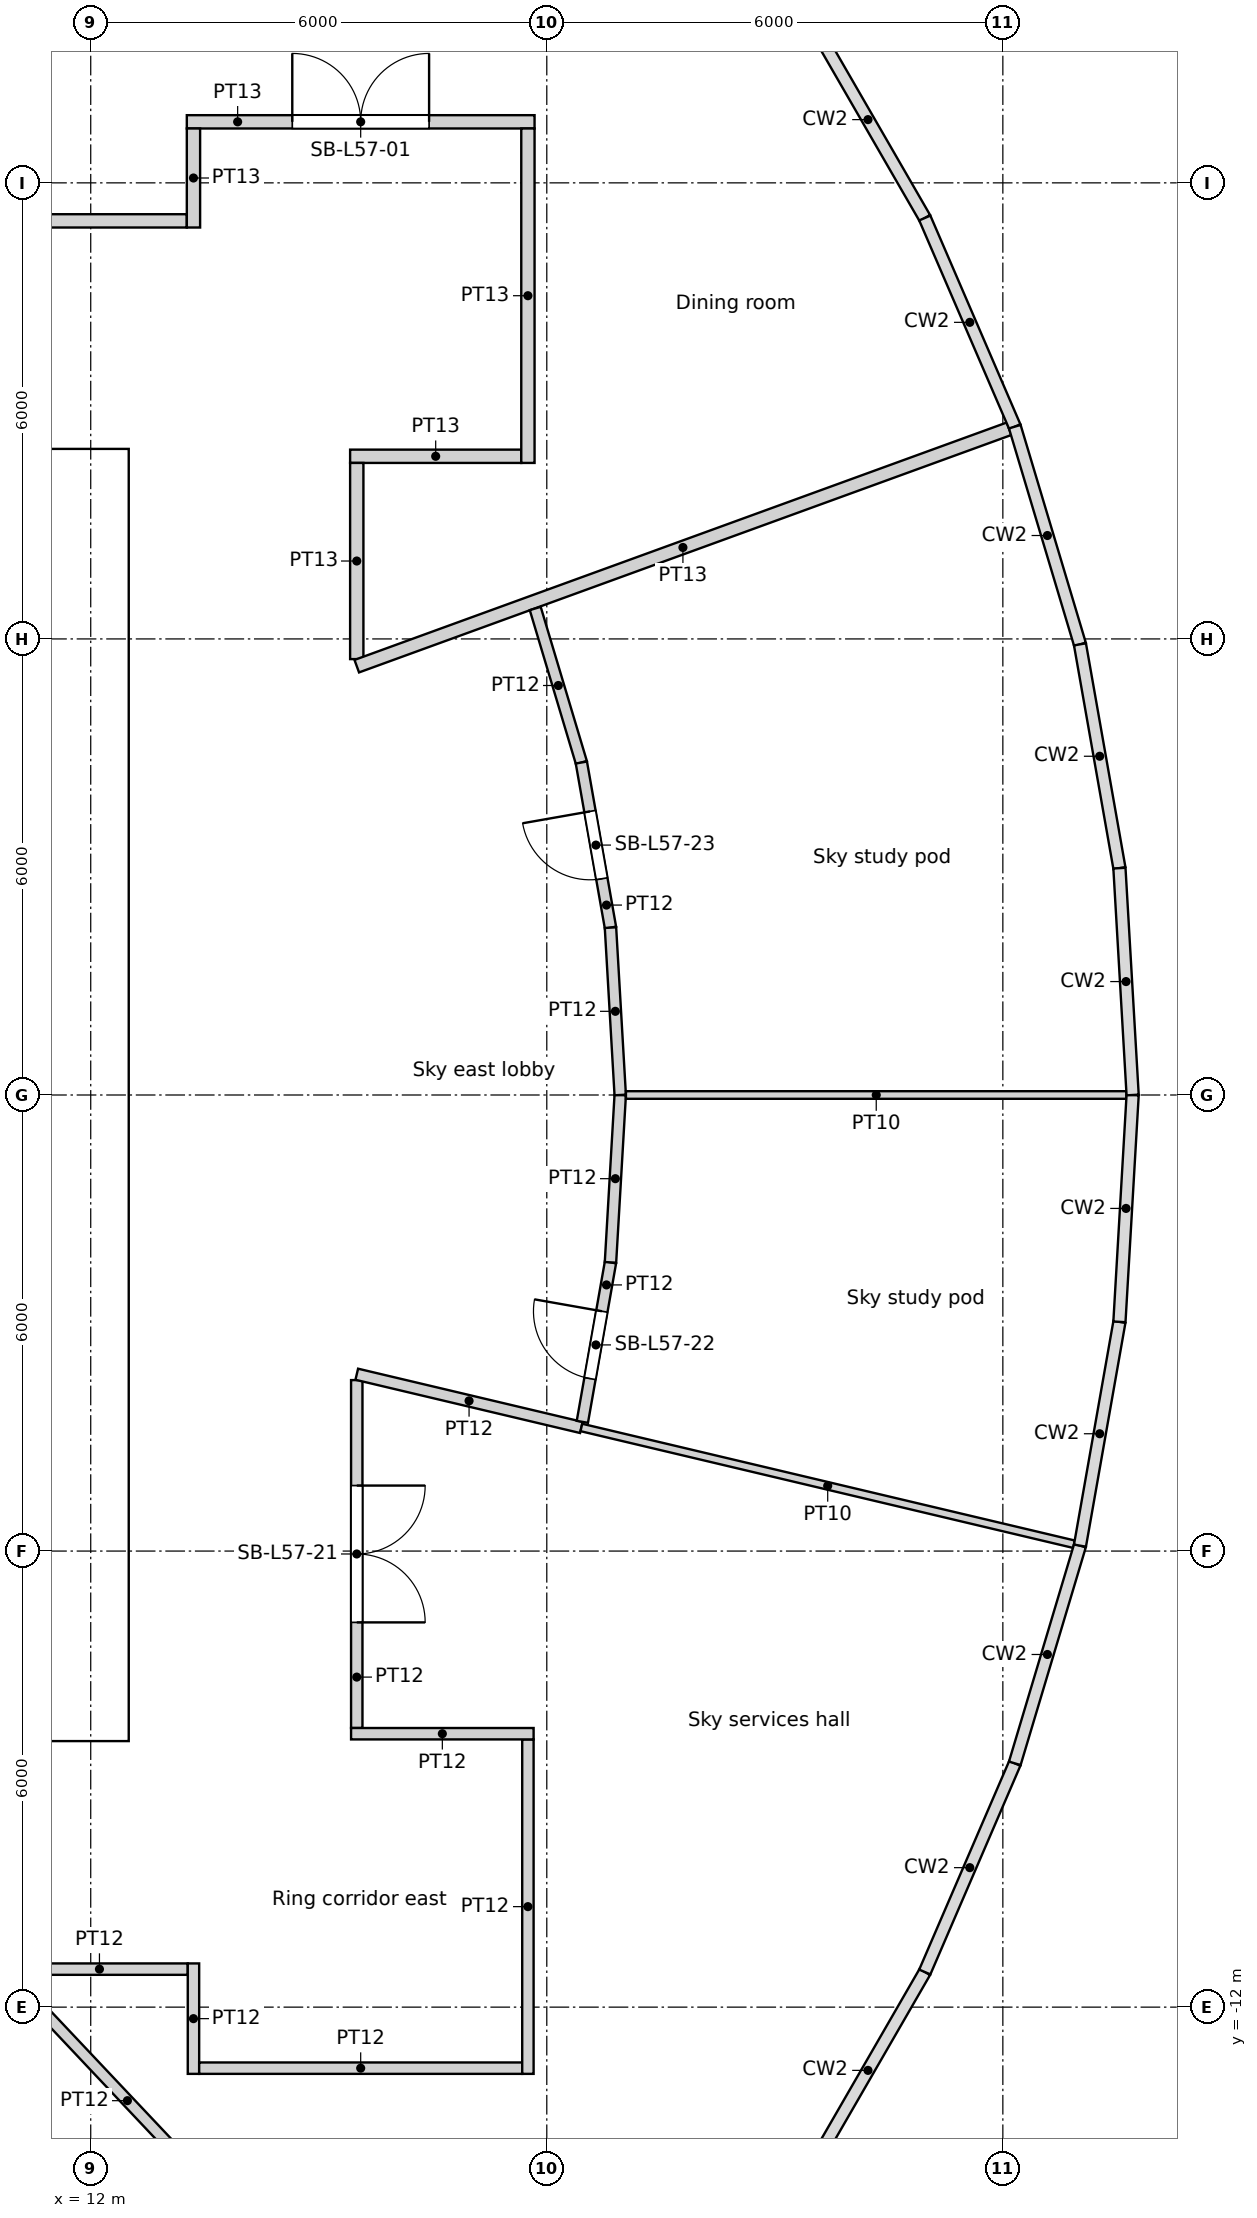
"""IFC4 building model, lengths in metres.
Left out: names, types, materials, properties, quantities, classifications, styles, units other than length and angle.
Written with IfcOpenShell. Run it as: python <this file> out.ifc"""

import sys

from ifc_helpers import new_model, si_unit, direction, frame, frame_2d, origin, origin_2d, place, context, subcontext, project, spatial, rectangle, circle, extrude, element, fill, save


model = new_model("IFC4")
c1 = context("Model", 3, precision=1e-05, world=origin(), true_north=direction((0.0, 1.0)))
c2 = subcontext(c1, "Body", "Model", "MODEL_VIEW")
j1 = project(units=[si_unit("LENGTHUNIT", "METRE"), si_unit("PLANEANGLEUNIT", "RADIAN")], contexts=[c1])
p1 = place(None, origin())
s1 = spatial("IfcSite", under=j1, at=p1, CompositionType="ELEMENT")
p2 = place(p1, origin())
s2 = spatial("IfcBuilding", under=s1, at=p2, CompositionType="ELEMENT")
p3 = place(p2, frame((0.0, 0.0, 219.6)))
s3 = spatial("IfcBuildingStorey", under=s2, at=p3, CompositionType="ELEMENT", Elevation=219.6)
for number, where, z_axis, x_axis in (
    (1, (24.548, 0.0, 0.0), (0.0, 0.0, 1.0), (1.0, 0.0, 0.0)),
    (2, (23.886, 5.661, 0.0), (0.0, 0.0, 1.0), (1.0, 0.0, 0.0)),
    (3, (21.937, 11.017, 0.0), (0.0, 0.0, 1.0), (1.0, 0.0, 0.0)),
    (4, (21.937, -11.017, 0.0), (0.0, 0.0, 1.0), (1.0, 0.0, 0.0)),
    (5, (23.886, -5.661, 0.0), (0.0, 0.0, 1.0), (1.0, 0.0, 0.0)),
):
    element("IfcColumn", number, at=place(p3, frame(where, z_axis=z_axis, x_axis=x_axis)), inside=s3, PredefinedType="COLUMN", context=c2, shape_type="SweptSolid", body=[
        extrude(circle(Radius=0.6, at=origin_2d()), origin(), (0.0, 0.0, 1.0), 5.4),
    ])
for number, where, z_axis, x_axis in (
    (6, (18.822, 0.0, 0.0), (0.0, 0.0, 1.0), (1.0, 0.0, 0.0)),
    (7, (17.986, 5.548, 0.0), (0.0, 0.0, 1.0), (1.0, 0.0, 0.0)),
    (8, (15.552, 10.603, 0.0), (0.0, 0.0, 1.0), (1.0, 0.0, 0.0)),
    (9, (15.552, -10.603, 0.0), (0.0, 0.0, 1.0), (1.0, 0.0, 0.0)),
    (10, (17.986, -5.548, 0.0), (0.0, 0.0, 1.0), (1.0, 0.0, 0.0)),
):
    element("IfcColumn", number, at=place(p3, frame(where, z_axis=z_axis, x_axis=x_axis)), inside=s3, PredefinedType="COLUMN", context=c2, shape_type="SweptSolid", body=[
        extrude(circle(Radius=0.65, at=origin_2d()), origin(), (0.0, 0.0, 1.0), 5.4),
    ])
p4 = place(p3, frame((-12.5, -8.05, 0.0), z_axis=(0.0, 0.0, 1.0), x_axis=(1.0, 0.0, 0.0)))
e11 = element("IfcWall", 11, at=p4, inside=s3, PredefinedType="SOLIDWALL", context=c2, shape_type="SweptSolid", body=[
    extrude(rectangle(XDim=25.0, YDim=0.9, at=frame_2d((12.5, 0.0))), origin(), (0.0, 0.0, 1.0), 5.4),
])
p5 = place(p4, frame((13.4, 0.0, 0.0)))
e12 = element("IfcOpeningElement", 12, at=p5, cuts=e11, PredefinedType="OPENING", context=c2, shape_type="SweptSolid", body=[
    extrude(rectangle(XDim=1.0, YDim=2.1, at=frame_2d((0.5, 1.05))), frame((0.0, 0.45, 0.0), z_axis=(0.0, -1.0, 0.0), x_axis=(1.0, 0.0, 0.0)), (0.0, 0.0, 1.0), 0.9),
])
p6 = place(p4, frame((8.3, 0.0, 0.0)))
e13 = element("IfcOpeningElement", 13, at=p6, cuts=e11, PredefinedType="OPENING", context=c2, shape_type="SweptSolid", body=[
    extrude(rectangle(XDim=1.8, YDim=2.1, at=frame_2d((0.9, 1.05))), frame((0.0, 0.45, 0.0), z_axis=(0.0, -1.0, 0.0), x_axis=(1.0, 0.0, 0.0)), (0.0, 0.0, 1.0), 0.9),
])
p7 = place(p4, frame((14.9, 0.0, 0.0)))
e14 = element("IfcOpeningElement", 14, at=p7, cuts=e11, PredefinedType="OPENING", context=c2, shape_type="SweptSolid", body=[
    extrude(rectangle(XDim=1.8, YDim=2.1, at=frame_2d((0.9, 1.05))), frame((0.0, 0.45, 0.0), z_axis=(0.0, -1.0, 0.0), x_axis=(1.0, 0.0, 0.0)), (0.0, 0.0, 1.0), 0.9),
])
p8 = place(p3, frame((-12.5, 8.05, 0.0), z_axis=(0.0, 0.0, 1.0), x_axis=(1.0, 0.0, 0.0)))
e15 = element("IfcWall", 15, at=p8, inside=s3, PredefinedType="SOLIDWALL", context=c2, shape_type="SweptSolid", body=[
    extrude(rectangle(XDim=25.0, YDim=0.9, at=frame_2d((12.5, 0.0))), origin(), (0.0, 0.0, 1.0), 5.4),
])
p9 = place(p8, frame((8.3, 0.0, 0.0)))
e16 = element("IfcOpeningElement", 16, at=p9, cuts=e15, PredefinedType="OPENING", context=c2, shape_type="SweptSolid", body=[
    extrude(rectangle(XDim=1.8, YDim=2.1, at=frame_2d((0.9, 1.05))), frame((0.0, 0.45, 0.0), z_axis=(0.0, -1.0, 0.0), x_axis=(1.0, 0.0, 0.0)), (0.0, 0.0, 1.0), 0.9),
])
p10 = place(p3, frame((12.05, -7.6, 0.0), z_axis=(0.0, 0.0, 1.0), x_axis=(0.0, 1.0, 0.0)))
e17 = element("IfcWall", 17, at=p10, inside=s3, PredefinedType="SOLIDWALL", context=c2, shape_type="SweptSolid", body=[
    extrude(rectangle(XDim=15.2, YDim=0.9, at=frame_2d((7.6, 0.0))), origin(), (0.0, 0.0, 1.0), 5.4),
])
p11 = place(p10, frame((5.1, 0.0, 0.0)))
e18 = element("IfcOpeningElement", 18, at=p11, cuts=e17, PredefinedType="OPENING", context=c2, shape_type="SweptSolid", body=[
    extrude(rectangle(XDim=1.0, YDim=2.1, at=frame_2d((0.5, 1.05))), frame((0.0, 0.45, 0.0), z_axis=(0.0, -1.0, 0.0), x_axis=(1.0, 0.0, 0.0)), (0.0, 0.0, 1.0), 0.9),
])
p12 = place(p3, frame((9.2, -4.55, 0.0), z_axis=(0.0, 0.0, 1.0), x_axis=(1.0, 0.0, 0.0)))
e19 = element("IfcWall", 19, at=p12, inside=s3, PredefinedType="SOLIDWALL", context=c2, shape_type="SweptSolid", body=[
    extrude(rectangle(XDim=2.4, YDim=0.3, at=frame_2d((1.2, 0.0))), origin(), (0.0, 0.0, 1.0), 4.9),
])
p13 = place(p12, frame((0.65, 0.0, 0.0)))
e20 = element("IfcOpeningElement", 20, at=p13, cuts=e19, PredefinedType="OPENING", context=c2, shape_type="SweptSolid", body=[
    extrude(rectangle(XDim=1.1, YDim=2.1, at=frame_2d((0.55, 1.05))), frame((0.0, 0.15, 0.0), z_axis=(0.0, -1.0, 0.0), x_axis=(1.0, 0.0, 0.0)), (0.0, 0.0, 1.0), 0.3),
])
p14 = place(p3, frame((9.2, 4.55, 0.0), z_axis=(0.0, 0.0, 1.0), x_axis=(1.0, 0.0, 0.0)))
e21 = element("IfcWall", 21, at=p14, inside=s3, PredefinedType="SOLIDWALL", context=c2, shape_type="SweptSolid", body=[
    extrude(rectangle(XDim=2.4, YDim=0.3, at=frame_2d((1.2, 0.0))), origin(), (0.0, 0.0, 1.0), 4.9),
])
p15 = place(p14, frame((0.65, 0.0, 0.0)))
e22 = element("IfcOpeningElement", 22, at=p15, cuts=e21, PredefinedType="OPENING", context=c2, shape_type="SweptSolid", body=[
    extrude(rectangle(XDim=1.1, YDim=2.1, at=frame_2d((0.55, 1.05))), frame((0.0, 0.15, 0.0), z_axis=(0.0, -1.0, 0.0), x_axis=(1.0, 0.0, 0.0)), (0.0, 0.0, 1.0), 0.3),
])
p16 = place(p3, frame((10.953, -11.5, 0.0), z_axis=(0.0, 0.0, 1.0), x_axis=(1.0, 0.0, 0.0)))
e23 = element("IfcWall", 23, at=p16, inside=s3, PredefinedType="PARTITIONING", context=c2, shape_type="SweptSolid", body=[
    extrude(rectangle(XDim=2.324, YDim=0.15, at=frame_2d((1.162, 0.0))), origin(), (0.0, 0.0, 1.0), 4.1),
])
p17 = place(p3, frame((13.427, -12.803, 0.0), z_axis=(0.0, 0.0, 1.0), x_axis=(1.0, 0.0, 0.0)))
e24 = element("IfcWall", 24, at=p17, inside=s3, PredefinedType="PARTITIONING", context=c2, shape_type="SweptSolid", body=[
    extrude(rectangle(XDim=4.25, YDim=0.15, at=frame_2d((2.125, 0.0))), origin(), (0.0, 0.0, 1.0), 4.1),
])
p18 = place(p3, frame((13.352, -11.425, 0.0), z_axis=(0.0, 0.0, 1.0), x_axis=(0.0, -1.0, 0.0)))
e25 = element("IfcWall", 25, at=p18, inside=s3, PredefinedType="PARTITIONING", context=c2, shape_type="SweptSolid", body=[
    extrude(rectangle(XDim=1.453, YDim=0.15, at=frame_2d((0.727, 0.0))), origin(), (0.0, 0.0, 1.0), 4.1),
])
p19 = place(p3, frame((13.264, 11.5, 0.0), z_axis=(0.0, 0.0, 1.0), x_axis=(-1.0, 0.0, 0.0)))
e26 = element("IfcWall", 26, at=p19, inside=s3, PredefinedType="PARTITIONING", context=c2, shape_type="SweptSolid", body=[
    extrude(rectangle(XDim=4.594, YDim=0.175, at=frame_2d((2.297, 0.0))), origin(), (0.0, 0.0, 1.0), 4.1),
])
p20 = place(p3, frame((13.352, 12.715, 0.0), z_axis=(0.0, 0.0, 1.0), x_axis=(0.0, -1.0, 0.0)))
e27 = element("IfcWall", 27, at=p20, inside=s3, PredefinedType="PARTITIONING", context=c2, shape_type="SweptSolid", body=[
    extrude(rectangle(XDim=1.303, YDim=0.175, at=frame_2d((0.651, 0.0))), origin(), (0.0, 0.0, 1.0), 4.1),
])
p21 = place(p3, frame((14.115, -14.961, 0.0), z_axis=(0.0, 0.0, 1.0), x_axis=(-0.686260376194, 0.727355962418, 0.0)))
e28 = element("IfcWall", 28, at=p21, inside=s3, PredefinedType="PARTITIONING", context=c2, shape_type="SweptSolid", body=[
    extrude(rectangle(XDim=4.759, YDim=0.15, at=frame_2d((2.379, 0.0))), origin(), (0.0, 0.0, 1.0), 4.1),
])
p22 = place(p3, frame((15.304, 20.556, 0.0), z_axis=(0.0, 0.0, 1.0), x_axis=(-0.597169661875, -0.802114951199, 0.0)))
e29 = element("IfcWall", 29, at=p22, inside=s3, PredefinedType="PARTITIONING", context=c2, shape_type="SweptSolid", body=[
    extrude(rectangle(XDim=11.291, YDim=0.175, at=frame_2d((5.645, 0.0))), origin(), (0.0, 0.0, 1.0), 4.1),
])
p23 = place(p3, frame((15.5, -3.751, 0.0), z_axis=(0.0, 0.0, 1.0), x_axis=(0.0, -1.0, 0.0)))
e30 = element("IfcWall", 30, at=p23, inside=s3, PredefinedType="PARTITIONING", context=c2, shape_type="SweptSolid", body=[
    extrude(rectangle(XDim=4.577, YDim=0.15, at=frame_2d((2.289, 0.0))), origin(), (0.0, 0.0, 1.0), 4.1),
])
p24 = place(p23, frame((1.388, 0.0, 0.0)))
e31 = element("IfcOpeningElement", 31, at=p24, cuts=e30, PredefinedType="OPENING", context=c2, shape_type="SweptSolid", body=[
    extrude(rectangle(XDim=1.8, YDim=2.4, at=frame_2d((0.9, 1.2))), frame((0.0, 0.075, 0.0), z_axis=(0.0, -1.0, 0.0), x_axis=(1.0, 0.0, 0.0)), (0.0, 0.0, 1.0), 0.15),
])
p25 = place(p3, frame((15.5, 5.735, 0.0), z_axis=(0.0, 0.0, 1.0), x_axis=(0.0, 1.0, 0.0)))
e32 = element("IfcWall", 32, at=p25, inside=s3, PredefinedType="PARTITIONING", context=c2, shape_type="SweptSolid", body=[
    extrude(rectangle(XDim=2.581, YDim=0.175, at=frame_2d((1.291, 0.0))), origin(), (0.0, 0.0, 1.0), 4.1),
])
p26 = place(p3, frame((15.413, 8.403, 0.0), z_axis=(0.0, 0.0, 1.0), x_axis=(1.0, 0.0, 0.0)))
e33 = element("IfcWall", 33, at=p26, inside=s3, PredefinedType="PARTITIONING", context=c2, shape_type="SweptSolid", body=[
    extrude(rectangle(XDim=2.251, YDim=0.175, at=frame_2d((1.126, 0.0))), origin(), (0.0, 0.0, 1.0), 4.1),
])
p27 = place(p3, frame((17.752, -12.878, 0.0), z_axis=(0.0, 0.0, 1.0), x_axis=(0.0, 1.0, 0.0)))
e34 = element("IfcWall", 34, at=p27, inside=s3, PredefinedType="PARTITIONING", context=c2, shape_type="SweptSolid", body=[
    extrude(rectangle(XDim=4.4, YDim=0.15, at=frame_2d((2.2, 0.0))), origin(), (0.0, 0.0, 1.0), 4.1),
])
p28 = place(p3, frame((17.827, -8.403, 0.0), z_axis=(0.0, 0.0, 1.0), x_axis=(-1.0, 0.0, 0.0)))
e35 = element("IfcWall", 35, at=p28, inside=s3, PredefinedType="PARTITIONING", context=c2, shape_type="SweptSolid", body=[
    extrude(rectangle(XDim=2.402, YDim=0.15, at=frame_2d((1.201, 0.0))), origin(), (0.0, 0.0, 1.0), 4.1),
])
p29 = place(p3, frame((17.752, 8.315, 0.0), z_axis=(0.0, 0.0, 1.0), x_axis=(0.0, 1.0, 0.0)))
e36 = element("IfcWall", 36, at=p29, inside=s3, PredefinedType="PARTITIONING", context=c2, shape_type="SweptSolid", body=[
    extrude(rectangle(XDim=4.4, YDim=0.175, at=frame_2d((2.2, 0.0))), origin(), (0.0, 0.0, 1.0), 4.1),
])
p30 = place(p3, frame((13.264, 12.803, 0.0), z_axis=(0.0, 0.0, 1.0), x_axis=(1.0, 0.0, 0.0)))
e37 = element("IfcWall", 37, at=p30, inside=s3, PredefinedType="PARTITIONING", context=c2, shape_type="SweptSolid", body=[
    extrude(rectangle(XDim=4.575, YDim=0.175, at=frame_2d((2.288, 0.0))), origin(), (0.0, 0.0, 1.0), 4.1),
])
p31 = place(p30, frame((1.387, 0.0, 0.0)))
e38 = element("IfcOpeningElement", 38, at=p31, cuts=e37, PredefinedType="OPENING", context=c2, shape_type="SweptSolid", body=[
    extrude(rectangle(XDim=1.8, YDim=2.4, at=frame_2d((0.9, 1.2))), frame((0.0, 0.087, 0.0), z_axis=(0.0, -1.0, 0.0), x_axis=(1.0, 0.0, 0.0)), (0.0, 0.0, 1.0), 0.175),
])
p32 = place(p3, frame((18.455, -4.374, 0.0), z_axis=(0.0, 0.0, 1.0), x_axis=(-0.973053235534, 0.230580573371, 0.0)))
e39 = element("IfcWall", 39, at=p32, inside=s3, PredefinedType="PARTITIONING", context=c2, shape_type="SweptSolid", body=[
    extrude(rectangle(XDim=3.037, YDim=0.15, at=frame_2d((1.518, 0.0))), origin(), (0.0, 0.0, 1.0), 4.1),
])
p33 = place(p3, frame((18.838, -2.202, 0.0), z_axis=(0.0, 0.0, 1.0), x_axis=(-0.173628421176, -0.98481123641, 0.0)))
e40 = element("IfcWall", 40, at=p33, inside=s3, PredefinedType="PARTITIONING", context=c2, shape_type="SweptSolid", body=[
    extrude(rectangle(XDim=2.13, YDim=0.15, at=frame_2d((1.065, 0.0))), origin(), (0.0, 0.0, 1.0), 4.1),
])
p34 = place(p33, frame((0.653, 0.0, 0.0)))
e41 = element("IfcOpeningElement", 41, at=p34, cuts=e40, PredefinedType="OPENING", context=c2, shape_type="SweptSolid", body=[
    extrude(rectangle(XDim=0.9, YDim=2.1, at=frame_2d((0.45, 1.05))), frame((0.0, 0.075, 0.0), z_axis=(0.0, -1.0, 0.0), x_axis=(1.0, 0.0, 0.0)), (0.0, 0.0, 1.0), 0.15),
])
p35 = place(p3, frame((18.455, 4.374, 0.0), z_axis=(0.0, 0.0, 1.0), x_axis=(-0.286754978778, 0.95800395727, 0.0)))
e42 = element("IfcWall", 42, at=p35, inside=s3, PredefinedType="PARTITIONING", context=c2, shape_type="SweptSolid", body=[
    extrude(rectangle(XDim=2.116, YDim=0.15, at=frame_2d((1.058, 0.0))), origin(), (0.0, 0.0, 1.0), 4.1),
])
p36 = place(p3, frame((18.838, -2.202, 0.0), z_axis=(0.0, 0.0, 1.0), x_axis=(0.058112072782, 0.998310065559, 0.0)))
e43 = element("IfcWall", 43, at=p36, inside=s3, PredefinedType="PARTITIONING", context=c2, shape_type="SweptSolid", body=[
    extrude(rectangle(XDim=2.206, YDim=0.15, at=frame_2d((1.103, 0.0))), origin(), (0.0, 0.0, 1.0), 4.1),
])
p37 = place(p3, frame((18.455, 4.374, 0.0), z_axis=(0.0, 0.0, 1.0), x_axis=(0.173690605338, -0.984800270927, 0.0)))
e44 = element("IfcWall", 44, at=p37, inside=s3, PredefinedType="PARTITIONING", context=c2, shape_type="SweptSolid", body=[
    extrude(rectangle(XDim=2.205, YDim=0.15, at=frame_2d((1.103, 0.0))), origin(), (0.0, 0.0, 1.0), 4.1),
])
p38 = place(p37, frame((0.653, 0.0, 0.0)))
e45 = element("IfcOpeningElement", 45, at=p38, cuts=e44, PredefinedType="OPENING", context=c2, shape_type="SweptSolid", body=[
    extrude(rectangle(XDim=0.9, YDim=2.1, at=frame_2d((0.45, 1.05))), frame((0.0, 0.075, 0.0), z_axis=(0.0, -1.0, 0.0), x_axis=(1.0, 0.0, 0.0)), (0.0, 0.0, 1.0), 0.15),
])
p39 = place(p3, frame((18.966, 0.0, 0.0), z_axis=(0.0, 0.0, 1.0), x_axis=(-0.058112072782, 0.998310065559, 0.0)))
e46 = element("IfcWall", 46, at=p39, inside=s3, PredefinedType="PARTITIONING", context=c2, shape_type="SweptSolid", body=[
    extrude(rectangle(XDim=2.206, YDim=0.15, at=frame_2d((1.103, 0.0))), origin(), (0.0, 0.0, 1.0), 4.1),
])
p40 = place(p3, frame((24.082, 8.765, 0.0), z_axis=(0.0, 0.0, 1.0), x_axis=(-0.939691913717, -0.342022085975, 0.0)))
e47 = element("IfcWall", 47, at=p40, inside=s3, PredefinedType="PARTITIONING", context=c2, shape_type="SweptSolid", body=[
    extrude(rectangle(XDim=9.133, YDim=0.175, at=frame_2d((4.566, 0.0))), origin(), (0.0, 0.0, 1.0), 4.1),
])
p41 = place(p3, frame((24.937, -5.91, 0.0), z_axis=(0.0, 0.0, 1.0), x_axis=(-0.973038525817, 0.230642639759, 0.0)))
e48 = element("IfcWall", 48, at=p41, inside=s3, PredefinedType="PARTITIONING", context=c2, shape_type="SweptSolid", body=[
    extrude(rectangle(XDim=6.661, YDim=0.1, at=frame_2d((3.331, 0.0))), origin(), (0.0, 0.0, 1.0), 4.1),
])
p42 = place(p3, frame((25.627, 0.0, 0.0), z_axis=(0.0, 0.0, 1.0), x_axis=(-1.0, 0.0, 0.0)))
e49 = element("IfcWall", 49, at=p42, inside=s3, PredefinedType="PARTITIONING", context=c2, shape_type="SweptSolid", body=[
    extrude(rectangle(XDim=6.586, YDim=0.1, at=frame_2d((3.293, 0.0))), origin(), (0.0, 0.0, 1.0), 4.1),
])
p43 = place(p11, origin())
e50 = element("IfcDoor", 50, at=p43, inside=s3, OperationType="DOUBLE_DOOR_SINGLE_SWING", PredefinedType="DOOR", context=c2, shape_type="SweptSolid", body=[
    extrude(rectangle(XDim=1.0, YDim=2.1, at=frame_2d((0.5, 1.05))), frame((0.0, 0.025, 0.0), z_axis=(0.0, -1.0, 0.0), x_axis=(1.0, 0.0, 0.0)), (0.0, 0.0, 1.0), 0.05),
])
fill(e18, e50)
p44 = place(p31, origin())
e51 = element("IfcDoor", 51, at=p44, inside=s3, OperationType="DOUBLE_DOOR_SINGLE_SWING", PredefinedType="DOOR", context=c2, shape_type="SweptSolid", body=[
    extrude(rectangle(XDim=1.8, YDim=2.4, at=frame_2d((0.9, 1.2))), frame((0.0, 0.025, 0.0), z_axis=(0.0, -1.0, 0.0), x_axis=(1.0, 0.0, 0.0)), (0.0, 0.0, 1.0), 0.05),
])
fill(e38, e51)
p45 = place(p24, origin())
e52 = element("IfcDoor", 52, at=p45, inside=s3, OperationType="DOUBLE_DOOR_SINGLE_SWING", PredefinedType="DOOR", context=c2, shape_type="SweptSolid", body=[
    extrude(rectangle(XDim=1.8, YDim=2.4, at=frame_2d((0.9, 1.2))), frame((0.0, 0.025, 0.0), z_axis=(0.0, -1.0, 0.0), x_axis=(1.0, 0.0, 0.0)), (0.0, 0.0, 1.0), 0.05),
])
fill(e31, e52)
p46 = place(p34, origin())
e53 = element("IfcDoor", 53, at=p46, inside=s3, OperationType="SINGLE_SWING_RIGHT", PredefinedType="DOOR", context=c2, shape_type="SweptSolid", body=[
    extrude(rectangle(XDim=0.9, YDim=2.1, at=frame_2d((0.45, 1.05))), frame((0.0, 0.025, 0.0), z_axis=(0.0, -1.0, 0.0), x_axis=(1.0, 0.0, 0.0)), (0.0, 0.0, 1.0), 0.05),
])
fill(e41, e53)
p47 = place(p38, origin())
e54 = element("IfcDoor", 54, at=p47, inside=s3, OperationType="SINGLE_SWING_RIGHT", PredefinedType="DOOR", context=c2, shape_type="SweptSolid", body=[
    extrude(rectangle(XDim=0.9, YDim=2.1, at=frame_2d((0.45, 1.05))), frame((0.0, 0.025, 0.0), z_axis=(0.0, -1.0, 0.0), x_axis=(1.0, 0.0, 0.0)), (0.0, 0.0, 1.0), 0.05),
])
fill(e45, e54)
save(model, sys.argv[1])
